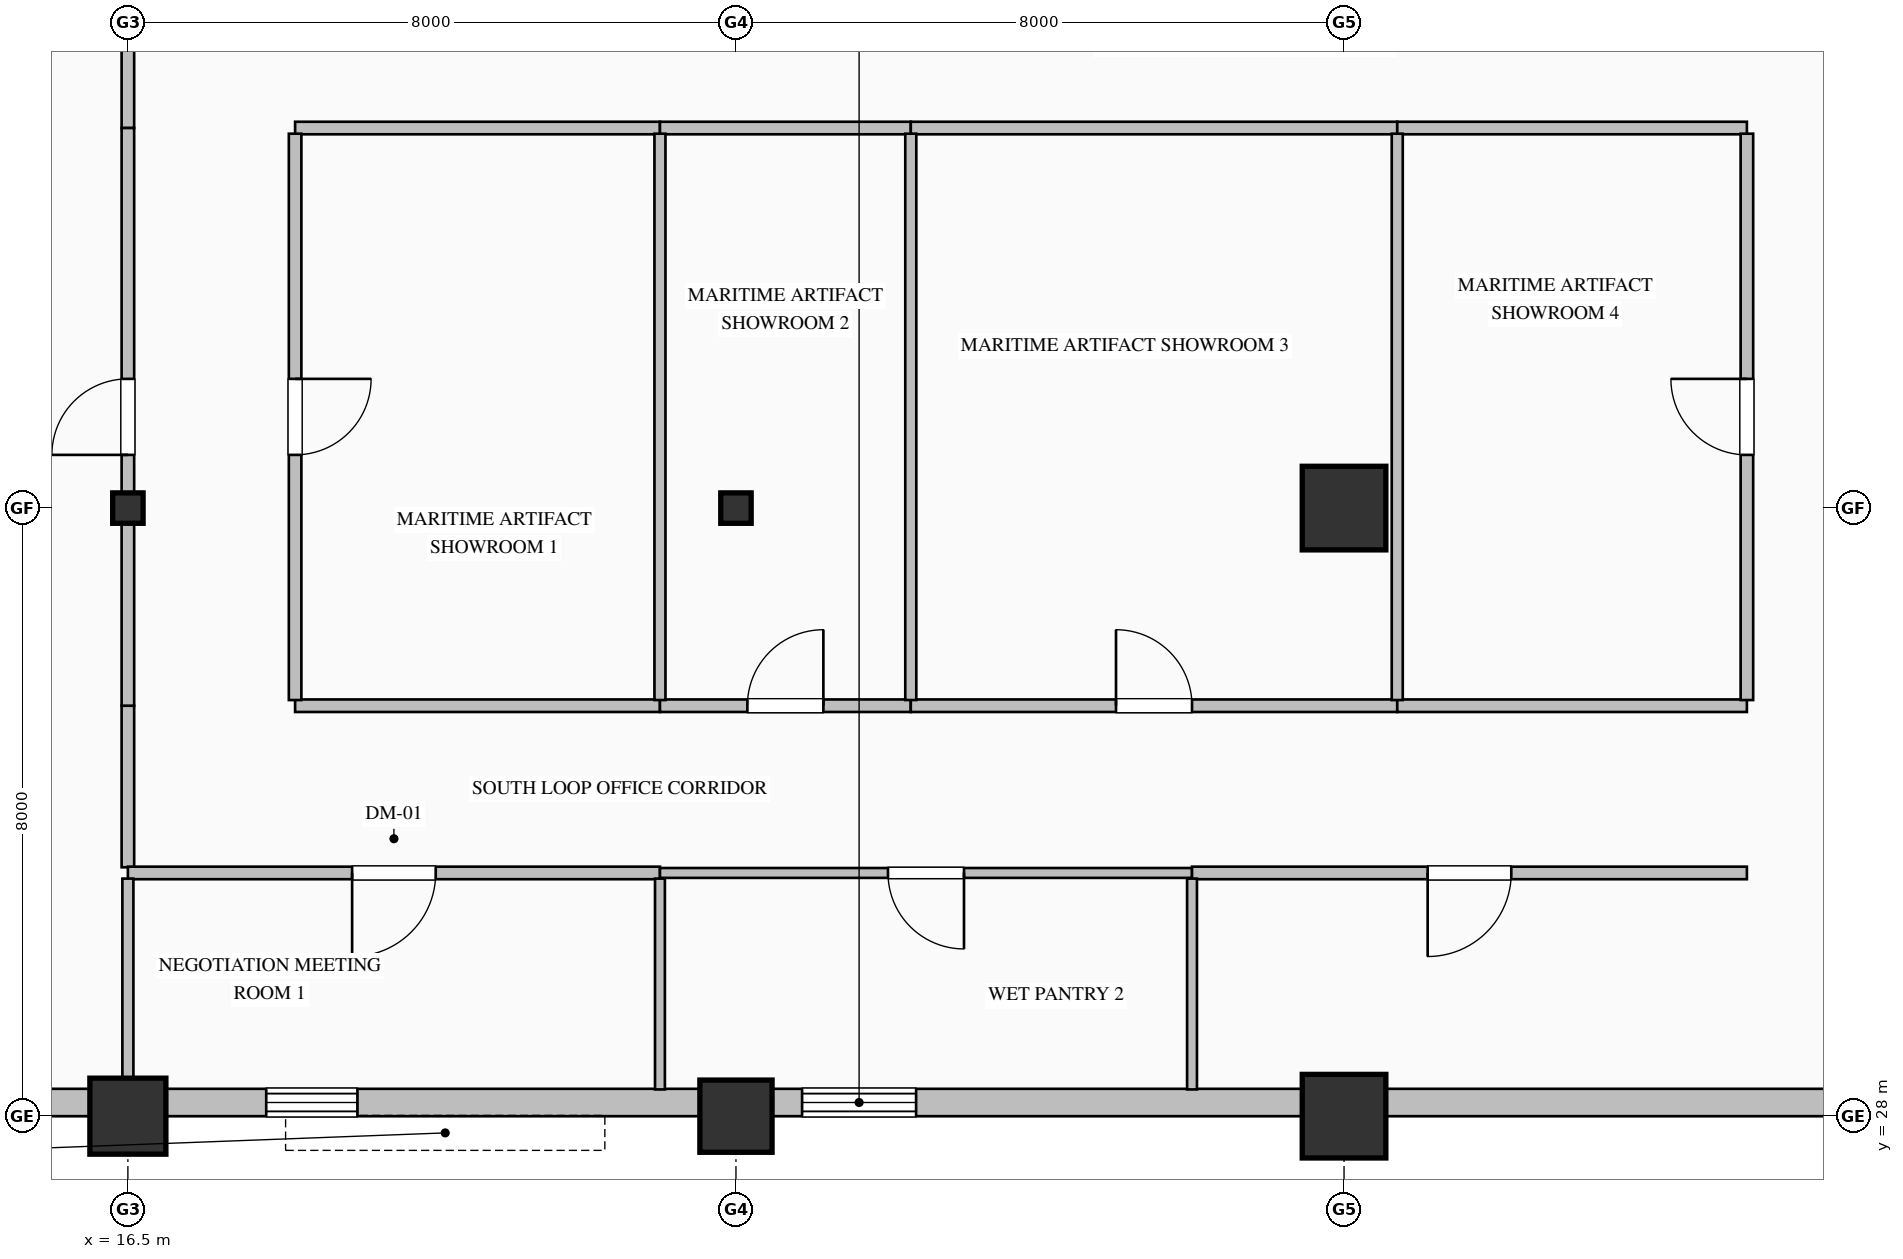
"""IFC4 building model, lengths in metres.
Left out: names, types, materials, properties, quantities, classifications, styles, units other than length and angle.
Written with IfcOpenShell. Run it as: python <this file> out.ifc"""

import sys

from ifc_helpers import new_model, si_unit, direction, frame, frame_2d, origin, origin_2d, place, context, subcontext, project, spatial, rectangle, hollow_rectangle, hollow_circle, i_section, extrude, element, fill, save


model = new_model("IFC4")
c1 = context("Model", 3, precision=1e-05, world=origin(), true_north=direction((0.0, 1.0)))
c2 = subcontext(c1, "Body", "Model", "MODEL_VIEW")
j1 = project(units=[si_unit("LENGTHUNIT", "METRE"), si_unit("PLANEANGLEUNIT", "RADIAN")], contexts=[c1])
p1 = place(None, origin())
s1 = spatial("IfcSite", under=j1, at=p1, CompositionType="ELEMENT")
p2 = place(p1, origin())
s2 = spatial("IfcBuilding", under=s1, at=p2, CompositionType="ELEMENT")
p3 = place(p2, frame((0.0, 0.0, 183.0)))
s3 = spatial("IfcBuildingStorey", under=s2, at=p3, CompositionType="ELEMENT", Elevation=183.0)
p4 = place(p3, frame((16.5, 28.0, 0.0), z_axis=(0.0, 0.0, 1.0), x_axis=(1.0, 0.0, 0.0)))
e1 = element("IfcColumn", 1, at=p4, inside=s3, PredefinedType="COLUMN", context=c2, shape_type="SweptSolid", body=[
    extrude(hollow_circle(Radius=0.5, WallThickness=0.036, at=origin_2d()), origin(), (0.0, 0.0, 1.0), 4.0),
])
p5 = place(p3, frame((16.5, 36.0, 0.0), z_axis=(0.0, 0.0, 1.0), x_axis=(1.0, 0.0, 0.0)))
e2 = element("IfcColumn", 2, at=p5, inside=s3, PredefinedType="COLUMN", context=c2, shape_type="SweptSolid", body=[
    extrude(i_section(OverallWidth=0.4, OverallDepth=0.4, WebThickness=0.013, FlangeThickness=0.021, FilletRadius=0.022, at=origin_2d()), origin(), (0.0, 0.0, 1.0), 4.0),
])
p6 = place(p3, frame((24.5, 28.0, 0.0), z_axis=(0.0, 0.0, 1.0), x_axis=(1.0, 0.0, 0.0)))
e3 = element("IfcColumn", 3, at=p6, inside=s3, PredefinedType="COLUMN", context=c2, shape_type="SweptSolid", body=[
    extrude(hollow_rectangle(XDim=0.95, YDim=0.95, WallThickness=0.036, at=origin_2d()), origin(), (0.0, 0.0, 1.0), 4.0),
])
p7 = place(p3, frame((24.5, 36.0, 0.0), z_axis=(0.0, 0.0, 1.0), x_axis=(1.0, 0.0, 0.0)))
e4 = element("IfcColumn", 4, at=p7, inside=s3, PredefinedType="COLUMN", context=c2, shape_type="SweptSolid", body=[
    extrude(i_section(OverallWidth=0.4, OverallDepth=0.4, WebThickness=0.013, FlangeThickness=0.021, FilletRadius=0.022, at=origin_2d()), origin(), (0.0, 0.0, 1.0), 4.0),
])
for number, where, z_axis, x_axis in (
    (5, (32.5, 28.0, 0.0), (0.0, 0.0, 1.0), (1.0, 0.0, 0.0)),
    (6, (32.5, 36.0, 0.0), (0.0, 0.0, 1.0), (1.0, 0.0, 0.0)),
):
    element("IfcColumn", number, at=place(p3, frame(where, z_axis=z_axis, x_axis=x_axis)), inside=s3, PredefinedType="COLUMN", context=c2, shape_type="SweptSolid", body=[
        extrude(hollow_rectangle(XDim=1.1, YDim=1.1, WallThickness=0.04, at=origin_2d()), origin(), (0.0, 0.0, 1.0), 4.0),
    ])
p8 = place(p3, frame((40.52, 28.18, 0.0), z_axis=(0.0, 0.0, 1.0), x_axis=(-1.0, 0.0, 0.0)))
e7 = element("IfcWall", 7, at=p8, inside=s3, PredefinedType="SOLIDWALL", context=c2, shape_type="SweptSolid", body=[
    extrude(rectangle(XDim=27.52, YDim=0.36, at=frame_2d((13.76, 0.0))), origin(), (0.0, 0.0, 1.0), 3.165),
])
p9 = place(p8, frame((13.65, 0.0, 0.85)))
e8 = element("IfcOpeningElement", 8, at=p9, cuts=e7, PredefinedType="OPENING", context=c2, shape_type="SweptSolid", body=[
    extrude(rectangle(XDim=1.5, YDim=1.95, at=frame_2d((0.75, 0.975))), frame((0.0, 0.19, 0.0), z_axis=(0.0, -1.0, 0.0), x_axis=(1.0, 0.0, 0.0)), (0.0, 0.0, 1.0), 0.38),
])
p10 = place(p8, frame((21.0, 0.0, 0.7)))
e9 = element("IfcOpeningElement", 9, at=p10, cuts=e7, PredefinedType="OPENING", context=c2, shape_type="SweptSolid", body=[
    extrude(rectangle(XDim=1.2, YDim=1.85, at=frame_2d((0.6, 0.925))), frame((0.0, 0.19, 0.0), z_axis=(0.0, -1.0, 0.0), x_axis=(1.0, 0.0, 0.0)), (0.0, 0.0, 1.0), 0.38),
])
p11 = place(p3, frame((18.7, 33.4, 0.0), z_axis=(0.0, 0.0, 1.0), x_axis=(1.0, 0.0, 0.0)))
e10 = element("IfcWall", 10, at=p11, inside=s3, PredefinedType="PARTITIONING", context=c2, shape_type="SweptSolid", body=[
    extrude(rectangle(XDim=4.8, YDim=0.165, at=frame_2d((2.4, 0.0))), origin(), (0.0, 0.0, 1.0), 3.765),
])
p12 = place(p3, frame((23.5, 33.4, 0.0), z_axis=(0.0, 0.0, 1.0), x_axis=(1.0, 0.0, 0.0)))
e11 = element("IfcWall", 11, at=p12, inside=s3, PredefinedType="PARTITIONING", context=c2, shape_type="SweptSolid", body=[
    extrude(rectangle(XDim=3.3, YDim=0.165, at=frame_2d((1.65, 0.0))), origin(), (0.0, 0.0, 1.0), 3.765),
])
p13 = place(p12, frame((1.15, 0.0, 0.0)))
e12 = element("IfcOpeningElement", 12, at=p13, cuts=e11, PredefinedType="OPENING", context=c2, shape_type="SweptSolid", body=[
    extrude(rectangle(XDim=1.0, YDim=2.15, at=frame_2d((0.5, 1.075))), frame((0.0, 0.093, 0.0), z_axis=(0.0, -1.0, 0.0), x_axis=(1.0, 0.0, 0.0)), (0.0, 0.0, 1.0), 0.185),
])
p14 = place(p3, frame((26.8, 33.4, 0.0), z_axis=(0.0, 0.0, 1.0), x_axis=(1.0, 0.0, 0.0)))
e13 = element("IfcWall", 13, at=p14, inside=s3, PredefinedType="PARTITIONING", context=c2, shape_type="SweptSolid", body=[
    extrude(rectangle(XDim=6.4, YDim=0.165, at=frame_2d((3.2, 0.0))), origin(), (0.0, 0.0, 1.0), 3.765),
])
p15 = place(p14, frame((2.7, 0.0, 0.0)))
e14 = element("IfcOpeningElement", 14, at=p15, cuts=e13, PredefinedType="OPENING", context=c2, shape_type="SweptSolid", body=[
    extrude(rectangle(XDim=1.0, YDim=2.15, at=frame_2d((0.5, 1.075))), frame((0.0, 0.093, 0.0), z_axis=(0.0, -1.0, 0.0), x_axis=(1.0, 0.0, 0.0)), (0.0, 0.0, 1.0), 0.185),
])
p16 = place(p3, frame((33.2, 33.4, 0.0), z_axis=(0.0, 0.0, 1.0), x_axis=(1.0, 0.0, 0.0)))
e15 = element("IfcWall", 15, at=p16, inside=s3, PredefinedType="PARTITIONING", context=c2, shape_type="SweptSolid", body=[
    extrude(rectangle(XDim=4.6, YDim=0.165, at=frame_2d((2.3, 0.0))), origin(), (0.0, 0.0, 1.0), 3.765),
])
p17 = place(p3, frame((16.5, 31.274, 0.0), z_axis=(0.0, 0.0, 1.0), x_axis=(0.0, 1.0, 0.0)))
e16 = element("IfcWall", 16, at=p17, inside=s3, PredefinedType="PARTITIONING", context=c2, shape_type="SweptSolid", body=[
    extrude(rectangle(XDim=2.125, YDim=0.165, at=frame_2d((1.063, 0.0))), origin(), (0.0, 0.0, 1.0), 3.157),
])
p18 = place(p3, frame((23.5, 31.2, 0.0), z_axis=(0.0, 0.0, 1.0), x_axis=(-1.0, 0.0, 0.0)))
e17 = element("IfcWall", 17, at=p18, inside=s3, PredefinedType="PARTITIONING", context=c2, shape_type="SweptSolid", body=[
    extrude(rectangle(XDim=7.0, YDim=0.165, at=frame_2d((3.5, 0.0))), origin(), (0.0, 0.0, 1.0), 3.765),
])
p19 = place(p18, frame((2.95, 0.0, 0.0)))
e18 = element("IfcOpeningElement", 18, at=p19, cuts=e17, PredefinedType="OPENING", context=c2, shape_type="SweptSolid", body=[
    extrude(rectangle(XDim=1.1, YDim=2.2, at=frame_2d((0.55, 1.1))), frame((0.0, 0.093, 0.0), z_axis=(0.0, -1.0, 0.0), x_axis=(1.0, 0.0, 0.0)), (0.0, 0.0, 1.0), 0.185),
])
p20 = place(p3, frame((30.5, 31.2, 0.0), z_axis=(0.0, 0.0, 1.0), x_axis=(-1.0, 0.0, 0.0)))
e19 = element("IfcWall", 19, at=p20, inside=s3, PredefinedType="PARTITIONING", context=c2, shape_type="SweptSolid", body=[
    extrude(rectangle(XDim=7.0, YDim=0.13, at=frame_2d((3.5, 0.0))), origin(), (0.0, 0.0, 1.0), 3.765),
])
p21 = place(p20, frame((3.0, 0.0, 0.0)))
e20 = element("IfcOpeningElement", 20, at=p21, cuts=e19, PredefinedType="OPENING", context=c2, shape_type="SweptSolid", body=[
    extrude(rectangle(XDim=1.0, YDim=2.15, at=frame_2d((0.5, 1.075))), frame((0.0, 0.075, 0.0), z_axis=(0.0, -1.0, 0.0), x_axis=(1.0, 0.0, 0.0)), (0.0, 0.0, 1.0), 0.15),
])
p22 = place(p3, frame((37.8, 31.2, 0.0), z_axis=(0.0, 0.0, 1.0), x_axis=(-1.0, 0.0, 0.0)))
e21 = element("IfcWall", 21, at=p22, inside=s3, PredefinedType="PARTITIONING", context=c2, shape_type="SweptSolid", body=[
    extrude(rectangle(XDim=7.3, YDim=0.165, at=frame_2d((3.65, 0.0))), origin(), (0.0, 0.0, 1.0), 3.765),
])
p23 = place(p22, frame((3.1, 0.0, 0.0)))
e22 = element("IfcOpeningElement", 22, at=p23, cuts=e21, PredefinedType="OPENING", context=c2, shape_type="SweptSolid", body=[
    extrude(rectangle(XDim=1.1, YDim=2.2, at=frame_2d((0.55, 1.1))), frame((0.0, 0.093, 0.0), z_axis=(0.0, -1.0, 0.0), x_axis=(1.0, 0.0, 0.0)), (0.0, 0.0, 1.0), 0.185),
])
p24 = place(p3, frame((23.5, 41.0, 0.0), z_axis=(0.0, 0.0, 1.0), x_axis=(-1.0, 0.0, 0.0)))
e23 = element("IfcWall", 23, at=p24, inside=s3, PredefinedType="PARTITIONING", context=c2, shape_type="SweptSolid", body=[
    extrude(rectangle(XDim=4.8, YDim=0.165, at=frame_2d((2.4, 0.0))), origin(), (0.0, 0.0, 1.0), 3.765),
])
p25 = place(p3, frame((26.8, 41.0, 0.0), z_axis=(0.0, 0.0, 1.0), x_axis=(-1.0, 0.0, 0.0)))
e24 = element("IfcWall", 24, at=p25, inside=s3, PredefinedType="PARTITIONING", context=c2, shape_type="SweptSolid", body=[
    extrude(rectangle(XDim=3.3, YDim=0.165, at=frame_2d((1.65, 0.0))), origin(), (0.0, 0.0, 1.0), 3.765),
])
p26 = place(p3, frame((33.2, 41.0, 0.0), z_axis=(0.0, 0.0, 1.0), x_axis=(-1.0, 0.0, 0.0)))
e25 = element("IfcWall", 25, at=p26, inside=s3, PredefinedType="PARTITIONING", context=c2, shape_type="SweptSolid", body=[
    extrude(rectangle(XDim=6.4, YDim=0.165, at=frame_2d((3.2, 0.0))), origin(), (0.0, 0.0, 1.0), 3.765),
])
p27 = place(p3, frame((37.8, 41.0, 0.0), z_axis=(0.0, 0.0, 1.0), x_axis=(-1.0, 0.0, 0.0)))
e26 = element("IfcWall", 26, at=p27, inside=s3, PredefinedType="PARTITIONING", context=c2, shape_type="SweptSolid", body=[
    extrude(rectangle(XDim=4.6, YDim=0.165, at=frame_2d((2.3, 0.0))), origin(), (0.0, 0.0, 1.0), 3.765),
])
p28 = place(p3, frame((16.5, 41.0, 0.0), z_axis=(0.0, 0.0, 1.0), x_axis=(0.0, 1.0, 0.0)))
e27 = element("IfcWall", 27, at=p28, inside=s3, PredefinedType="PARTITIONING", context=c2, shape_type="SweptSolid", body=[
    extrude(rectangle(XDim=2.125, YDim=0.165, at=frame_2d((1.063, 0.0))), origin(), (0.0, 0.0, 1.0), 3.157),
])
p29 = place(p3, frame((18.7, 40.926, 0.0), z_axis=(0.0, 0.0, 1.0), x_axis=(0.0, -1.0, 0.0)))
e28 = element("IfcWall", 28, at=p29, inside=s3, PredefinedType="PARTITIONING", context=c2, shape_type="SweptSolid", body=[
    extrude(rectangle(XDim=7.451, YDim=0.165, at=frame_2d((3.726, 0.0))), origin(), (0.0, 0.0, 1.0), 3.765),
])
p30 = place(p29, frame((3.226, 0.0, 0.0)))
e29 = element("IfcOpeningElement", 29, at=p30, cuts=e28, PredefinedType="OPENING", context=c2, shape_type="SweptSolid", body=[
    extrude(rectangle(XDim=1.0, YDim=2.15, at=frame_2d((0.5, 1.075))), frame((0.0, 0.093, 0.0), z_axis=(0.0, -1.0, 0.0), x_axis=(1.0, 0.0, 0.0)), (0.0, 0.0, 1.0), 0.185),
])
p31 = place(p3, frame((16.5, 33.4, 0.0), z_axis=(0.0, 0.0, 1.0), x_axis=(0.0, 1.0, 0.0)))
e30 = element("IfcWall", 30, at=p31, inside=s3, PredefinedType="PARTITIONING", context=c2, shape_type="SweptSolid", body=[
    extrude(rectangle(XDim=7.6, YDim=0.165, at=frame_2d((3.8, 0.0))), origin(), (0.0, 0.0, 1.0), 3.157),
])
p32 = place(p31, frame((3.3, 0.0, 0.0)))
e31 = element("IfcOpeningElement", 31, at=p32, cuts=e30, PredefinedType="OPENING", context=c2, shape_type="SweptSolid", body=[
    extrude(rectangle(XDim=1.0, YDim=2.15, at=frame_2d((0.5, 1.075))), frame((0.0, 0.093, 0.0), z_axis=(0.0, -1.0, 0.0), x_axis=(1.0, 0.0, 0.0)), (0.0, 0.0, 1.0), 0.185),
])
p33 = place(p3, frame((37.8, 33.475, 0.0), z_axis=(0.0, 0.0, 1.0), x_axis=(0.0, 1.0, 0.0)))
e32 = element("IfcWall", 32, at=p33, inside=s3, PredefinedType="PARTITIONING", context=c2, shape_type="SweptSolid", body=[
    extrude(rectangle(XDim=7.451, YDim=0.165, at=frame_2d((3.726, 0.0))), origin(), (0.0, 0.0, 1.0), 3.765),
])
p34 = place(p33, frame((3.226, 0.0, 0.0)))
e33 = element("IfcOpeningElement", 33, at=p34, cuts=e32, PredefinedType="OPENING", context=c2, shape_type="SweptSolid", body=[
    extrude(rectangle(XDim=1.0, YDim=2.15, at=frame_2d((0.5, 1.075))), frame((0.0, 0.093, 0.0), z_axis=(0.0, -1.0, 0.0), x_axis=(1.0, 0.0, 0.0)), (0.0, 0.0, 1.0), 0.185),
])
for number, where, z_axis, x_axis in (
    (34, (23.5, 40.926, 0.0), (0.0, 0.0, 1.0), (0.0, -1.0, 0.0)),
    (35, (26.8, 40.926, 0.0), (0.0, 0.0, 1.0), (0.0, -1.0, 0.0)),
    (36, (33.2, 40.926, 0.0), (0.0, 0.0, 1.0), (0.0, -1.0, 0.0)),
):
    element("IfcWall", number, at=place(p3, frame(where, z_axis=z_axis, x_axis=x_axis)), inside=s3, PredefinedType="PARTITIONING", context=c2, shape_type="SweptSolid", body=[
        extrude(rectangle(XDim=7.451, YDim=0.145, at=frame_2d((3.726, 0.0))), origin(), (0.0, 0.0, 1.0), 3.765),
    ])
p35 = place(p3, frame((16.5, 31.125, 0.0), z_axis=(0.0, 0.0, 1.0), x_axis=(0.0, -1.0, 0.0)))
e37 = element("IfcWall", 37, at=p35, inside=s3, PredefinedType="PARTITIONING", context=c2, shape_type="SweptSolid", body=[
    extrude(rectangle(XDim=2.773, YDim=0.145, at=frame_2d((1.387, 0.0))), origin(), (0.0, 0.0, 1.0), 3.157),
])
for number, where, z_axis, x_axis in (
    (38, (23.5, 31.125, 0.0), (0.0, 0.0, 1.0), (0.0, -1.0, 0.0)),
    (39, (30.5, 31.125, 0.0), (0.0, 0.0, 1.0), (0.0, -1.0, 0.0)),
):
    element("IfcWall", number, at=place(p3, frame(where, z_axis=z_axis, x_axis=x_axis)), inside=s3, PredefinedType="PARTITIONING", context=c2, shape_type="SweptSolid", body=[
        extrude(rectangle(XDim=2.773, YDim=0.13, at=frame_2d((1.387, 0.0))), origin(), (0.0, 0.0, 1.0), 3.765),
    ])
p36 = place(p9, origin())
e40 = element("IfcWindow", 40, at=p36, inside=s3, PartitioningType="DOUBLE_PANEL_VERTICAL", PredefinedType="WINDOW", context=c2, shape_type="SweptSolid", body=[
    extrude(rectangle(XDim=1.5, YDim=1.95, at=frame_2d((0.75, 0.975))), frame((0.0, 0.15, 0.0), z_axis=(0.0, -1.0, 0.0), x_axis=(1.0, 0.0, 0.0)), (0.0, 0.0, 1.0), 0.06),
])
fill(e8, e40)
p37 = place(p10, origin())
e41 = element("IfcWindow", 41, at=p37, inside=s3, PartitioningType="DOUBLE_PANEL_VERTICAL", PredefinedType="WINDOW", context=c2, shape_type="SweptSolid", body=[
    extrude(rectangle(XDim=1.2, YDim=1.85, at=frame_2d((0.6, 0.925))), frame((0.0, 0.15, 0.0), z_axis=(0.0, -1.0, 0.0), x_axis=(1.0, 0.0, 0.0)), (0.0, 0.0, 1.0), 0.06),
])
fill(e9, e41)
p38 = place(p30, origin())
e42 = element("IfcDoor", 42, at=p38, inside=s3, OperationType="SINGLE_SWING_LEFT", PredefinedType="DOOR", context=c2, shape_type="SweptSolid", body=[
    extrude(rectangle(XDim=1.0, YDim=2.15, at=frame_2d((0.5, 1.075))), frame((0.0, 0.025, 0.0), z_axis=(0.0, -1.0, 0.0), x_axis=(1.0, 0.0, 0.0)), (0.0, 0.0, 1.0), 0.05),
])
fill(e29, e42)
p39 = place(p13, origin())
e43 = element("IfcDoor", 43, at=p39, inside=s3, OperationType="SINGLE_SWING_RIGHT", PredefinedType="DOOR", context=c2, shape_type="SweptSolid", body=[
    extrude(rectangle(XDim=1.0, YDim=2.15, at=frame_2d((0.5, 1.075))), frame((0.0, 0.025, 0.0), z_axis=(0.0, -1.0, 0.0), x_axis=(1.0, 0.0, 0.0)), (0.0, 0.0, 1.0), 0.05),
])
fill(e12, e43)
p40 = place(p15, origin())
e44 = element("IfcDoor", 44, at=p40, inside=s3, OperationType="SINGLE_SWING_LEFT", PredefinedType="DOOR", context=c2, shape_type="SweptSolid", body=[
    extrude(rectangle(XDim=1.0, YDim=2.15, at=frame_2d((0.5, 1.075))), frame((0.0, 0.025, 0.0), z_axis=(0.0, -1.0, 0.0), x_axis=(1.0, 0.0, 0.0)), (0.0, 0.0, 1.0), 0.05),
])
fill(e14, e44)
p41 = place(p34, origin())
e45 = element("IfcDoor", 45, at=p41, inside=s3, OperationType="SINGLE_SWING_RIGHT", PredefinedType="DOOR", context=c2, shape_type="SweptSolid", body=[
    extrude(rectangle(XDim=1.0, YDim=2.15, at=frame_2d((0.5, 1.075))), frame((0.0, 0.025, 0.0), z_axis=(0.0, -1.0, 0.0), x_axis=(1.0, 0.0, 0.0)), (0.0, 0.0, 1.0), 0.05),
])
fill(e33, e45)
p42 = place(p32, origin())
e46 = element("IfcDoor", 46, at=p42, inside=s3, OperationType="SINGLE_SWING_LEFT", PredefinedType="DOOR", context=c2, shape_type="SweptSolid", body=[
    extrude(rectangle(XDim=1.0, YDim=2.15, at=frame_2d((0.5, 1.075))), frame((0.0, 0.025, 0.0), z_axis=(0.0, -1.0, 0.0), x_axis=(1.0, 0.0, 0.0)), (0.0, 0.0, 1.0), 0.05),
])
fill(e31, e46)
p43 = place(p19, origin())
e47 = element("IfcDoor", 47, at=p43, inside=s3, OperationType="SINGLE_SWING_RIGHT", PredefinedType="DOOR", context=c2, shape_type="SweptSolid", body=[
    extrude(rectangle(XDim=1.1, YDim=2.2, at=frame_2d((0.55, 1.1))), frame((0.0, 0.025, 0.0), z_axis=(0.0, -1.0, 0.0), x_axis=(1.0, 0.0, 0.0)), (0.0, 0.0, 1.0), 0.05),
])
fill(e18, e47)
p44 = place(p21, origin())
e48 = element("IfcDoor", 48, at=p44, inside=s3, OperationType="SINGLE_SWING_LEFT", PredefinedType="DOOR", context=c2, shape_type="SweptSolid", body=[
    extrude(rectangle(XDim=1.0, YDim=2.15, at=frame_2d((0.5, 1.075))), frame((0.0, 0.025, 0.0), z_axis=(0.0, -1.0, 0.0), x_axis=(1.0, 0.0, 0.0)), (0.0, 0.0, 1.0), 0.05),
])
fill(e20, e48)
p45 = place(p23, origin())
e49 = element("IfcDoor", 49, at=p45, inside=s3, OperationType="SINGLE_SWING_RIGHT", PredefinedType="DOOR", context=c2, shape_type="SweptSolid", body=[
    extrude(rectangle(XDim=1.1, YDim=2.2, at=frame_2d((0.55, 1.1))), frame((0.0, 0.025, 0.0), z_axis=(0.0, -1.0, 0.0), x_axis=(1.0, 0.0, 0.0)), (0.0, 0.0, 1.0), 0.05),
])
fill(e22, e49)
save(model, sys.argv[1])
